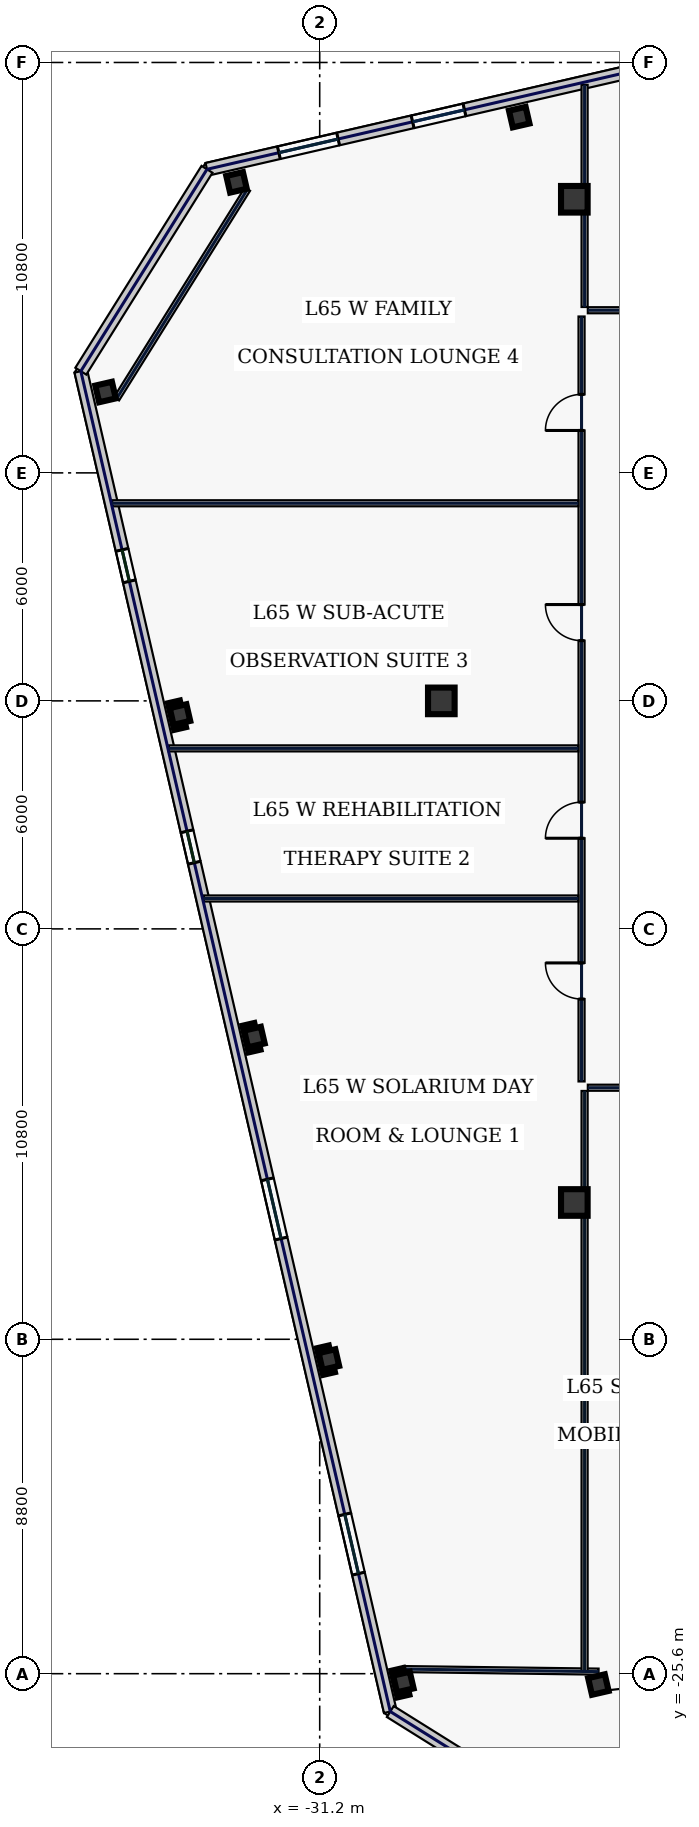
"""IFC4 building model, lengths in metres.
Left out: names, types, materials, properties, quantities, classifications, styles, units other than length and angle.
Written with IfcOpenShell. Run it as: python <this file> out.ifc"""

import sys

from ifc_helpers import new_model, si_unit, direction, frame, frame_2d, origin, origin_2d, place, context, subcontext, project, spatial, rectangle, hollow_rectangle, extrude, element, fill, save


model = new_model("IFC4")
c1 = context("Model", 3, precision=1e-05, world=origin(), true_north=direction((0.0, 1.0)))
c2 = subcontext(c1, "Body", "Model", "MODEL_VIEW")
j1 = project(units=[si_unit("LENGTHUNIT", "METRE"), si_unit("PLANEANGLEUNIT", "RADIAN")], contexts=[c1])
p1 = place(None, origin())
s1 = spatial("IfcSite", under=j1, at=p1, CompositionType="ELEMENT")
p2 = place(p1, origin())
s2 = spatial("IfcBuilding", under=s1, at=p2, CompositionType="ELEMENT")
p3 = place(p2, frame((0.0, 0.0, 281.0)))
s3 = spatial("IfcBuildingStorey", under=s2, at=p3, CompositionType="ELEMENT", Elevation=281.0)
for number, where, z_axis, x_axis in (
    (1, (-24.5, -13.2, 0.0), (0.0, 0.0, 1.0), (1.0, 0.0, 0.0)),
    (2, (-24.5, 13.2, 0.0), (0.0, 0.0, 1.0), (1.0, 0.0, 0.0)),
    (3, (-28.0, 0.0, 0.0), (0.0, 0.0, 1.0), (1.0, 0.0, 0.0)),
):
    element("IfcColumn", number, at=place(p3, frame(where, z_axis=z_axis, x_axis=x_axis)), inside=s3, PredefinedType="COLUMN", context=c2, shape_type="SweptSolid", body=[
        extrude(hollow_rectangle(XDim=0.7, YDim=0.7, WallThickness=0.032, at=origin_2d()), origin(), (0.0, 0.0, 1.0), 3.74),
    ])
for number, where, z_axis, x_axis in (
    (4, (-23.867, -25.886, 0.0), (0.0, 0.0, 1.0), (0.974, 0.225, 0.0)),
    (5, (-25.95, 15.362, 0.0), (0.0, 0.0, 1.0), (0.974, 0.225, 0.0)),
    (6, (-33.389, 13.645, 0.0), (0.0, 0.0, 1.0), (0.974, 0.225, 0.0)),
    (7, (-36.836, 8.128, 0.0), (0.0, 0.0, 1.0), (0.974, 0.225, 0.0)),
    (8, (-34.877, -0.359, 0.0), (0.0, 0.0, 1.0), (0.974, 0.225, 0.0)),
    (9, (-32.917, -8.845, 0.0), (0.0, 0.0, 1.0), (0.974, 0.225, 0.0)),
    (10, (-30.958, -17.332, 0.0), (0.0, 0.0, 1.0), (0.974, 0.225, 0.0)),
    (11, (-28.999, -25.819, 0.0), (0.0, 0.0, 1.0), (0.974, 0.225, 0.0)),
):
    element("IfcColumn", number, at=place(p3, frame(where, z_axis=z_axis, x_axis=x_axis)), inside=s3, PredefinedType="COLUMN", context=c2, shape_type="SweptSolid", body=[
        extrude(hollow_rectangle(XDim=0.45, YDim=0.45, WallThickness=0.022, at=origin_2d()), origin(), (0.0, 0.0, 1.0), 3.74),
    ])
p4 = place(p3, frame((-24.03, -29.916, 0.0), z_axis=(0.0, 0.0, 1.0), x_axis=(0.974371201193, 0.224946131964, 0.0)))
e12 = element("IfcWall", 12, at=p4, inside=s3, PredefinedType="STANDARD", context=c2, shape_type="SweptSolid", body=[
    extrude(rectangle(XDim=12.35, YDim=0.34, at=frame_2d((6.175, 0.0))), origin(), (0.0, 0.0, 1.0), 3.74),
])
p5 = place(p4, frame((2.35, 0.0, 0.9)))
e13 = element("IfcOpeningElement", 13, at=p5, cuts=e12, PredefinedType="OPENING", context=c2, shape_type="SweptSolid", body=[
    extrude(rectangle(XDim=1.5, YDim=2.0, at=frame_2d((0.75, 1.0))), frame((0.0, 0.18, 0.0), z_axis=(0.0, -1.0, 0.0), x_axis=(1.0, 0.0, 0.0)), (0.0, 0.0, 1.0), 0.36),
])
p6 = place(p4, frame((5.817, 0.0, 0.9)))
e14 = element("IfcOpeningElement", 14, at=p6, cuts=e12, PredefinedType="OPENING", context=c2, shape_type="SweptSolid", body=[
    extrude(rectangle(XDim=1.5, YDim=2.0, at=frame_2d((0.75, 1.0))), frame((0.0, 0.18, 0.0), z_axis=(0.0, -1.0, 0.0), x_axis=(1.0, 0.0, 0.0)), (0.0, 0.0, 1.0), 0.36),
])
p7 = place(p3, frame((-17.245, 17.895, 0.0), z_axis=(0.0, 0.0, 1.0), x_axis=(-0.97437318493, -0.224937539085, 0.0)))
e15 = element("IfcWall", 15, at=p7, inside=s3, PredefinedType="STANDARD", context=c2, shape_type="SweptSolid", body=[
    extrude(rectangle(XDim=17.366, YDim=0.34, at=frame_2d((8.683, 0.0))), origin(), (0.0, 0.0, 1.0), 3.74),
])
p8 = place(p7, frame((13.825, 0.0, 0.22)))
e16 = element("IfcOpeningElement", 16, at=p8, cuts=e15, PredefinedType="OPENING", context=c2, shape_type="SweptSolid", body=[
    extrude(rectangle(XDim=1.6, YDim=1.2, at=frame_2d((0.8, 0.6))), frame((0.0, 0.18, 0.0), z_axis=(0.0, -1.0, 0.0), x_axis=(1.0, 0.0, 0.0)), (0.0, 0.0, 1.0), 0.36),
])
p9 = place(p7, frame((10.413, 0.0, 1.0)))
e17 = element("IfcOpeningElement", 17, at=p9, cuts=e15, PredefinedType="OPENING", context=c2, shape_type="SweptSolid", body=[
    extrude(rectangle(XDim=1.4, YDim=1.85, at=frame_2d((0.7, 0.925))), frame((0.0, 0.18, 0.0), z_axis=(0.0, -1.0, 0.0), x_axis=(1.0, 0.0, 0.0)), (0.0, 0.0, 1.0), 0.36),
])
p10 = place(p7, frame((2.779, 0.0, 1.0)))
e18 = element("IfcOpeningElement", 18, at=p10, cuts=e15, PredefinedType="OPENING", context=c2, shape_type="SweptSolid", body=[
    extrude(rectangle(XDim=1.4, YDim=1.85, at=frame_2d((0.7, 0.925))), frame((0.0, 0.18, 0.0), z_axis=(0.0, -1.0, 0.0), x_axis=(1.0, 0.0, 0.0)), (0.0, 0.0, 1.0), 0.36),
])
p11 = place(p3, frame((-37.486, 8.676, 0.0), z_axis=(0.0, 0.0, 1.0), x_axis=(0.224953091034, -0.974369594576, 0.0)))
e19 = element("IfcWall", 19, at=p11, inside=s3, PredefinedType="STANDARD", context=c2, shape_type="SweptSolid", body=[
    extrude(rectangle(XDim=36.2, YDim=0.34, at=frame_2d((18.1, 0.0))), origin(), (0.0, 0.0, 1.0), 3.74),
])
p12 = place(p11, frame((4.825, 0.0, 0.75)))
e20 = element("IfcOpeningElement", 20, at=p12, cuts=e19, PredefinedType="OPENING", context=c2, shape_type="SweptSolid", body=[
    extrude(rectangle(XDim=0.85, YDim=1.85, at=frame_2d((0.425, 0.925))), frame((0.0, 0.18, 0.0), z_axis=(0.0, -1.0, 0.0), x_axis=(1.0, 0.0, 0.0)), (0.0, 0.0, 1.0), 0.36),
])
p13 = place(p11, frame((12.425, 0.0, 0.75)))
e21 = element("IfcOpeningElement", 21, at=p13, cuts=e19, PredefinedType="OPENING", context=c2, shape_type="SweptSolid", body=[
    extrude(rectangle(XDim=0.85, YDim=1.85, at=frame_2d((0.425, 0.925))), frame((0.0, 0.18, 0.0), z_axis=(0.0, -1.0, 0.0), x_axis=(1.0, 0.0, 0.0)), (0.0, 0.0, 1.0), 0.36),
])
p14 = place(p11, frame((21.825, 0.0, 0.58)))
e22 = element("IfcOpeningElement", 22, at=p14, cuts=e19, PredefinedType="OPENING", context=c2, shape_type="SweptSolid", body=[
    extrude(rectangle(XDim=1.6, YDim=2.3, at=frame_2d((0.8, 1.15))), frame((0.0, 0.18, 0.0), z_axis=(0.0, -1.0, 0.0), x_axis=(1.0, 0.0, 0.0)), (0.0, 0.0, 1.0), 0.36),
])
p15 = place(p11, frame((30.875, 0.0, 0.58)))
e23 = element("IfcOpeningElement", 23, at=p15, cuts=e19, PredefinedType="OPENING", context=c2, shape_type="SweptSolid", body=[
    extrude(rectangle(XDim=1.6, YDim=2.3, at=frame_2d((0.8, 1.15))), frame((0.0, 0.18, 0.0), z_axis=(0.0, -1.0, 0.0), x_axis=(1.0, 0.0, 0.0)), (0.0, 0.0, 1.0), 0.36),
])
for number, where, z_axis, x_axis in (
    (24, (-34.166, 13.989, 0.0), (0.0, 0.0, 1.0), (-0.53, -0.848, 0.0)),
    (25, (-29.343, -26.596, 0.0), (0.0, 0.0, 1.0), (0.848, -0.53, 0.0)),
):
    element("IfcWall", number, at=place(p3, frame(where, z_axis=z_axis, x_axis=x_axis)), inside=s3, PredefinedType="STANDARD", context=c2, shape_type="SweptSolid", body=[
        extrude(rectangle(XDim=6.265, YDim=0.34, at=frame_2d((3.133, 0.0))), origin(), (0.0, 0.0, 1.0), 3.74),
    ])
p16 = place(p3, frame((-33.1, 13.465, 0.0), z_axis=(0.0, 0.0, 1.0), x_axis=(-0.529958457806, -0.848023604035, 0.0)))
e26 = element("IfcWall", 26, at=p16, inside=s3, PredefinedType="PARTITIONING", context=c2, shape_type="SweptSolid", body=[
    extrude(rectangle(XDim=6.505, YDim=0.16, at=frame_2d((3.252, 0.0))), origin(), (0.0, 0.0, 1.0), 3.74),
])
p17 = place(p3, frame((-28.994, -25.479, 0.0), z_axis=(0.0, 0.0, 1.0), x_axis=(0.999915052546, -0.01303409726, 0.0)))
e27 = element("IfcWall", 27, at=p17, inside=s3, PredefinedType="PARTITIONING", context=c2, shape_type="SweptSolid", body=[
    extrude(rectangle(XDim=5.132, YDim=0.16, at=frame_2d((2.566, 0.0))), origin(), (0.0, 0.0, 1.0), 3.74),
])
p18 = place(p3, frame((-24.31, -10.015, 0.0), z_axis=(0.0, 0.0, 1.0), x_axis=(0.0, 1.0, 0.0)))
e28 = element("IfcWall", 28, at=p18, inside=s3, PredefinedType="PARTITIONING", context=c2, shape_type="SweptSolid", body=[
    extrude(rectangle(XDim=20.13, YDim=0.16, at=frame_2d((10.065, 0.0))), origin(), (0.0, 0.0, 1.0), 3.74),
])
p19 = place(p18, frame((2.169, 0.0, 0.0)))
e29 = element("IfcOpeningElement", 29, at=p19, cuts=e28, PredefinedType="OPENING", context=c2, shape_type="SweptSolid", body=[
    extrude(rectangle(XDim=0.95, YDim=2.2, at=frame_2d((0.475, 1.1))), frame((0.0, 0.09, 0.0), z_axis=(0.0, -1.0, 0.0), x_axis=(1.0, 0.0, 0.0)), (0.0, 0.0, 1.0), 0.18),
])
p20 = place(p18, frame((6.4, 0.0, 0.0)))
e30 = element("IfcOpeningElement", 30, at=p20, cuts=e28, PredefinedType="OPENING", context=c2, shape_type="SweptSolid", body=[
    extrude(rectangle(XDim=0.95, YDim=2.2, at=frame_2d((0.475, 1.1))), frame((0.0, 0.09, 0.0), z_axis=(0.0, -1.0, 0.0), x_axis=(1.0, 0.0, 0.0)), (0.0, 0.0, 1.0), 0.18),
])
p21 = place(p18, frame((11.6, 0.0, 0.0)))
e31 = element("IfcOpeningElement", 31, at=p21, cuts=e28, PredefinedType="OPENING", context=c2, shape_type="SweptSolid", body=[
    extrude(rectangle(XDim=0.95, YDim=2.2, at=frame_2d((0.475, 1.1))), frame((0.0, 0.09, 0.0), z_axis=(0.0, -1.0, 0.0), x_axis=(1.0, 0.0, 0.0)), (0.0, 0.0, 1.0), 0.18),
])
p22 = place(p18, frame((17.131, 0.0, 0.0)))
e32 = element("IfcOpeningElement", 32, at=p22, cuts=e28, PredefinedType="OPENING", context=c2, shape_type="SweptSolid", body=[
    extrude(rectangle(XDim=0.95, YDim=2.2, at=frame_2d((0.475, 1.1))), frame((0.0, 0.09, 0.0), z_axis=(0.0, -1.0, 0.0), x_axis=(1.0, 0.0, 0.0)), (0.0, 0.0, 1.0), 0.18),
])
p23 = place(p3, frame((-24.145, 10.28, 0.0), z_axis=(0.0, 0.0, 1.0), x_axis=(1.0, 0.0, 0.0)))
e33 = element("IfcWall", 33, at=p23, inside=s3, PredefinedType="PARTITIONING", context=c2, shape_type="SweptSolid", body=[
    extrude(rectangle(XDim=48.29, YDim=0.16, at=frame_2d((24.145, 0.0))), origin(), (0.0, 0.0, 1.0), 3.74),
])
p24 = place(p23, frame((5.534, 0.0, 0.0)))
e34 = element("IfcOpeningElement", 34, at=p24, cuts=e33, PredefinedType="OPENING", context=c2, shape_type="SweptSolid", body=[
    extrude(rectangle(XDim=0.95, YDim=2.2, at=frame_2d((0.475, 1.1))), frame((0.0, 0.09, 0.0), z_axis=(0.0, -1.0, 0.0), x_axis=(1.0, 0.0, 0.0)), (0.0, 0.0, 1.0), 0.18),
])
p25 = place(p23, frame((17.83, 0.0, 0.0)))
e35 = element("IfcOpeningElement", 35, at=p25, cuts=e33, PredefinedType="OPENING", context=c2, shape_type="SweptSolid", body=[
    extrude(rectangle(XDim=1.15, YDim=2.2, at=frame_2d((0.575, 1.1))), frame((0.0, 0.09, 0.0), z_axis=(0.0, -1.0, 0.0), x_axis=(1.0, 0.0, 0.0)), (0.0, 0.0, 1.0), 0.18),
])
p26 = place(p23, frame((30.73, 0.0, 0.0)))
e36 = element("IfcOpeningElement", 36, at=p26, cuts=e33, PredefinedType="OPENING", context=c2, shape_type="SweptSolid", body=[
    extrude(rectangle(XDim=0.95, YDim=2.2, at=frame_2d((0.475, 1.1))), frame((0.0, 0.09, 0.0), z_axis=(0.0, -1.0, 0.0), x_axis=(1.0, 0.0, 0.0)), (0.0, 0.0, 1.0), 0.18),
])
p27 = place(p23, frame((39.938, 0.0, 0.0)))
e37 = element("IfcOpeningElement", 37, at=p27, cuts=e33, PredefinedType="OPENING", context=c2, shape_type="SweptSolid", body=[
    extrude(rectangle(XDim=0.95, YDim=2.2, at=frame_2d((0.475, 1.1))), frame((0.0, 0.09, 0.0), z_axis=(0.0, -1.0, 0.0), x_axis=(1.0, 0.0, 0.0)), (0.0, 0.0, 1.0), 0.18),
])
p28 = place(p23, frame((45.258, 0.0, 0.0)))
e38 = element("IfcOpeningElement", 38, at=p28, cuts=e33, PredefinedType="OPENING", context=c2, shape_type="SweptSolid", body=[
    extrude(rectangle(XDim=1.05, YDim=2.2, at=frame_2d((0.525, 1.1))), frame((0.0, 0.09, 0.0), z_axis=(0.0, -1.0, 0.0), x_axis=(1.0, 0.0, 0.0)), (0.0, 0.0, 1.0), 0.18),
])
p29 = place(p3, frame((12.535, -10.18, 0.0), z_axis=(0.0, 0.0, 1.0), x_axis=(-1.0, 0.0, 0.0)))
e39 = element("IfcWall", 39, at=p29, inside=s3, PredefinedType="PARTITIONING", context=c2, shape_type="SweptSolid", body=[
    extrude(rectangle(XDim=36.68, YDim=0.16, at=frame_2d((18.34, 0.0))), origin(), (0.0, 0.0, 1.0), 3.74),
])
p30 = place(p29, frame((33.856, 0.0, 0.0)))
e40 = element("IfcOpeningElement", 40, at=p30, cuts=e39, PredefinedType="OPENING", context=c2, shape_type="SweptSolid", body=[
    extrude(rectangle(XDim=0.95, YDim=2.2, at=frame_2d((0.475, 1.1))), frame((0.0, 0.09, 0.0), z_axis=(0.0, -1.0, 0.0), x_axis=(1.0, 0.0, 0.0)), (0.0, 0.0, 1.0), 0.18),
])
p31 = place(p29, frame((29.015, 0.0, 0.0)))
e41 = element("IfcOpeningElement", 41, at=p31, cuts=e39, PredefinedType="OPENING", context=c2, shape_type="SweptSolid", body=[
    extrude(rectangle(XDim=0.95, YDim=2.2, at=frame_2d((0.475, 1.1))), frame((0.0, 0.09, 0.0), z_axis=(0.0, -1.0, 0.0), x_axis=(1.0, 0.0, 0.0)), (0.0, 0.0, 1.0), 0.18),
])
p32 = place(p29, frame((23.83, 0.0, 0.0)))
e42 = element("IfcOpeningElement", 42, at=p32, cuts=e39, PredefinedType="OPENING", context=c2, shape_type="SweptSolid", body=[
    extrude(rectangle(XDim=0.95, YDim=2.2, at=frame_2d((0.475, 1.1))), frame((0.0, 0.09, 0.0), z_axis=(0.0, -1.0, 0.0), x_axis=(1.0, 0.0, 0.0)), (0.0, 0.0, 1.0), 0.18),
])
p33 = place(p29, frame((17.751, 0.0, 0.0)))
e43 = element("IfcOpeningElement", 43, at=p33, cuts=e39, PredefinedType="OPENING", context=c2, shape_type="SweptSolid", body=[
    extrude(rectangle(XDim=1.15, YDim=2.2, at=frame_2d((0.575, 1.1))), frame((0.0, 0.09, 0.0), z_axis=(0.0, -1.0, 0.0), x_axis=(1.0, 0.0, 0.0)), (0.0, 0.0, 1.0), 0.18),
])
p34 = place(p29, frame((12.426, 0.0, 0.0)))
e44 = element("IfcOpeningElement", 44, at=p34, cuts=e39, PredefinedType="OPENING", context=c2, shape_type="SweptSolid", body=[
    extrude(rectangle(XDim=1.05, YDim=2.2, at=frame_2d((0.525, 1.1))), frame((0.0, 0.09, 0.0), z_axis=(0.0, -1.0, 0.0), x_axis=(1.0, 0.0, 0.0)), (0.0, 0.0, 1.0), 0.18),
])
p35 = place(p29, frame((5.545, 0.0, 0.0)))
e45 = element("IfcOpeningElement", 45, at=p35, cuts=e39, PredefinedType="OPENING", context=c2, shape_type="SweptSolid", body=[
    extrude(rectangle(XDim=0.95, YDim=2.2, at=frame_2d((0.475, 1.1))), frame((0.0, 0.09, 0.0), z_axis=(0.0, -1.0, 0.0), x_axis=(1.0, 0.0, 0.0)), (0.0, 0.0, 1.0), 0.18),
])
p36 = place(p3, frame((-24.23, 10.365, 0.0), z_axis=(0.0, 0.0, 1.0), x_axis=(0.0, 1.0, 0.0)))
e46 = element("IfcWall", 46, at=p36, inside=s3, PredefinedType="PARTITIONING", context=c2, shape_type="SweptSolid", body=[
    extrude(rectangle(XDim=5.846, YDim=0.16, at=frame_2d((2.923, 0.0))), origin(), (0.0, 0.0, 1.0), 3.74),
])
p37 = place(p3, frame((-24.23, -25.536, 0.0), z_axis=(0.0, 0.0, 1.0), x_axis=(0.0, 1.0, 0.0)))
e47 = element("IfcWall", 47, at=p37, inside=s3, PredefinedType="PARTITIONING", context=c2, shape_type="SweptSolid", body=[
    extrude(rectangle(XDim=15.271, YDim=0.16, at=frame_2d((7.635, 0.0))), origin(), (0.0, 0.0, 1.0), 2.135),
])
p38 = place(p3, frame((-34.262, -5.2, 0.0), z_axis=(0.0, 0.0, 1.0), x_axis=(1.0, 0.0, 0.0)))
e48 = element("IfcWall", 48, at=p38, inside=s3, PredefinedType="PARTITIONING", context=c2, shape_type="SweptSolid", body=[
    extrude(rectangle(XDim=9.867, YDim=0.16, at=frame_2d((4.933, 0.0))), origin(), (0.0, 0.0, 1.0), 3.74),
])
p39 = place(p3, frame((-35.174, -1.25, 0.0), z_axis=(0.0, 0.0, 1.0), x_axis=(1.0, 0.0, 0.0)))
e49 = element("IfcWall", 49, at=p39, inside=s3, PredefinedType="PARTITIONING", context=c2, shape_type="SweptSolid", body=[
    extrude(rectangle(XDim=10.779, YDim=0.16, at=frame_2d((5.389, 0.0))), origin(), (0.0, 0.0, 1.0), 3.74),
])
p40 = place(p3, frame((-36.663, 5.2, 0.0), z_axis=(0.0, 0.0, 1.0), x_axis=(1.0, 0.0, 0.0)))
e50 = element("IfcWall", 50, at=p40, inside=s3, PredefinedType="PARTITIONING", context=c2, shape_type="SweptSolid", body=[
    extrude(rectangle(XDim=12.268, YDim=0.16, at=frame_2d((6.134, 0.0))), origin(), (0.0, 0.0, 1.0), 3.74),
])
p41 = place(p8, origin())
e51 = element("IfcWindow", 51, at=p41, inside=s3, PartitioningType="SINGLE_PANEL", PredefinedType="WINDOW", context=c2, shape_type="SweptSolid", body=[
    extrude(rectangle(XDim=1.6, YDim=1.2, at=frame_2d((0.8, 0.6))), frame((0.0, 0.03, 0.0), z_axis=(0.0, -1.0, 0.0), x_axis=(1.0, 0.0, 0.0)), (0.0, 0.0, 1.0), 0.06),
])
fill(e16, e51)
p42 = place(p9, origin())
e52 = element("IfcWindow", 52, at=p42, inside=s3, PartitioningType="SINGLE_PANEL", PredefinedType="WINDOW", context=c2, shape_type="SweptSolid", body=[
    extrude(rectangle(XDim=1.4, YDim=1.85, at=frame_2d((0.7, 0.925))), frame((0.0, 0.03, 0.0), z_axis=(0.0, -1.0, 0.0), x_axis=(1.0, 0.0, 0.0)), (0.0, 0.0, 1.0), 0.06),
])
fill(e17, e52)
p43 = place(p12, origin())
e53 = element("IfcWindow", 53, at=p43, inside=s3, PartitioningType="SINGLE_PANEL", PredefinedType="WINDOW", context=c2, shape_type="SweptSolid", body=[
    extrude(rectangle(XDim=0.85, YDim=1.85, at=frame_2d((0.425, 0.925))), frame((0.0, 0.03, 0.0), z_axis=(0.0, -1.0, 0.0), x_axis=(1.0, 0.0, 0.0)), (0.0, 0.0, 1.0), 0.06),
])
fill(e20, e53)
p44 = place(p13, origin())
e54 = element("IfcWindow", 54, at=p44, inside=s3, PartitioningType="SINGLE_PANEL", PredefinedType="WINDOW", context=c2, shape_type="SweptSolid", body=[
    extrude(rectangle(XDim=0.85, YDim=1.85, at=frame_2d((0.425, 0.925))), frame((0.0, 0.03, 0.0), z_axis=(0.0, -1.0, 0.0), x_axis=(1.0, 0.0, 0.0)), (0.0, 0.0, 1.0), 0.06),
])
fill(e21, e54)
p45 = place(p14, origin())
e55 = element("IfcWindow", 55, at=p45, inside=s3, PartitioningType="SINGLE_PANEL", PredefinedType="WINDOW", context=c2, shape_type="SweptSolid", body=[
    extrude(rectangle(XDim=1.6, YDim=2.3, at=frame_2d((0.8, 1.15))), frame((0.0, 0.03, 0.0), z_axis=(0.0, -1.0, 0.0), x_axis=(1.0, 0.0, 0.0)), (0.0, 0.0, 1.0), 0.06),
])
fill(e22, e55)
p46 = place(p15, origin())
e56 = element("IfcWindow", 56, at=p46, inside=s3, PartitioningType="SINGLE_PANEL", PredefinedType="WINDOW", context=c2, shape_type="SweptSolid", body=[
    extrude(rectangle(XDim=1.6, YDim=2.3, at=frame_2d((0.8, 1.15))), frame((0.0, 0.03, 0.0), z_axis=(0.0, -1.0, 0.0), x_axis=(1.0, 0.0, 0.0)), (0.0, 0.0, 1.0), 0.06),
])
fill(e23, e56)
p47 = place(p19, origin())
e57 = element("IfcDoor", 57, at=p47, inside=s3, OperationType="SINGLE_SWING_RIGHT", PredefinedType="DOOR", context=c2, shape_type="SweptSolid", body=[
    extrude(rectangle(XDim=0.95, YDim=2.2, at=frame_2d((0.475, 1.1))), frame((0.0, 0.025, 0.0), z_axis=(0.0, -1.0, 0.0), x_axis=(1.0, 0.0, 0.0)), (0.0, 0.0, 1.0), 0.05),
])
fill(e29, e57)
p48 = place(p20, origin())
e58 = element("IfcDoor", 58, at=p48, inside=s3, OperationType="SINGLE_SWING_LEFT", PredefinedType="DOOR", context=c2, shape_type="SweptSolid", body=[
    extrude(rectangle(XDim=0.95, YDim=2.2, at=frame_2d((0.475, 1.1))), frame((0.0, 0.025, 0.0), z_axis=(0.0, -1.0, 0.0), x_axis=(1.0, 0.0, 0.0)), (0.0, 0.0, 1.0), 0.05),
])
fill(e30, e58)
p49 = place(p21, origin())
e59 = element("IfcDoor", 59, at=p49, inside=s3, OperationType="SINGLE_SWING_RIGHT", PredefinedType="DOOR", context=c2, shape_type="SweptSolid", body=[
    extrude(rectangle(XDim=0.95, YDim=2.2, at=frame_2d((0.475, 1.1))), frame((0.0, 0.025, 0.0), z_axis=(0.0, -1.0, 0.0), x_axis=(1.0, 0.0, 0.0)), (0.0, 0.0, 1.0), 0.05),
])
fill(e31, e59)
p50 = place(p22, origin())
e60 = element("IfcDoor", 60, at=p50, inside=s3, OperationType="SINGLE_SWING_LEFT", PredefinedType="DOOR", context=c2, shape_type="SweptSolid", body=[
    extrude(rectangle(XDim=0.95, YDim=2.2, at=frame_2d((0.475, 1.1))), frame((0.0, 0.025, 0.0), z_axis=(0.0, -1.0, 0.0), x_axis=(1.0, 0.0, 0.0)), (0.0, 0.0, 1.0), 0.05),
])
fill(e32, e60)
save(model, sys.argv[1])
